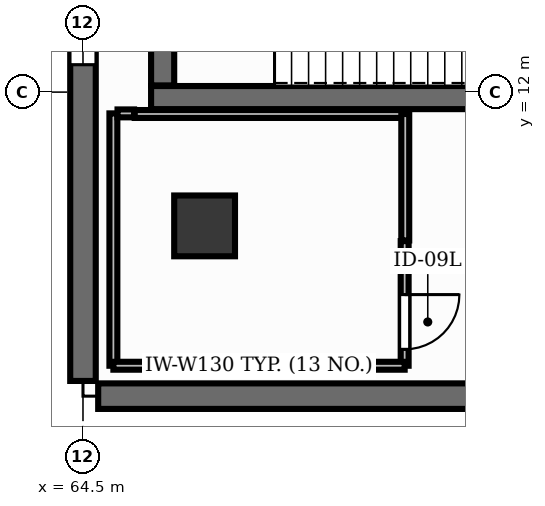
"""IFC4 building model, lengths in metres.
Left out: names, types, materials, properties, quantities, classifications, styles, units other than length and angle.
Written with IfcOpenShell. Run it as: python <this file> out.ifc"""

import sys

from ifc_helpers import new_model, si_unit, direction, frame, frame_2d, origin, origin_2d, place, context, subcontext, project, spatial, rectangle, extrude, element, fill, save


model = new_model("IFC4")
c1 = context("Model", 3, precision=1e-05, world=origin(), true_north=direction((0.0, 1.0)))
c2 = subcontext(c1, "Body", "Model", "MODEL_VIEW")
j1 = project(units=[si_unit("LENGTHUNIT", "METRE"), si_unit("PLANEANGLEUNIT", "RADIAN")], contexts=[c1])
p1 = place(None, origin())
s1 = spatial("IfcSite", under=j1, at=p1, CompositionType="ELEMENT")
p2 = place(p1, origin())
s2 = spatial("IfcBuilding", under=s1, at=p2, CompositionType="ELEMENT")
p3 = place(p2, frame((0.0, 0.0, 5.4)))
s3 = spatial("IfcBuildingStorey", under=s2, at=p3, CompositionType="ELEMENT", Elevation=5.4)
p4 = place(p3, frame((66.5, 9.8, 0.0), z_axis=(0.0, 0.0, 1.0), x_axis=(1.0, 0.0, 0.0)))
e1 = element("IfcColumn", 1, at=p4, inside=s3, PredefinedType="COLUMN", context=c2, shape_type="SweptSolid", body=[
    extrude(rectangle(XDim=1.0, YDim=1.0, at=origin_2d()), origin(), (0.0, 0.0, 1.0), 4.5),
])
p5 = place(p3, frame((64.5, 7.25, 0.0), z_axis=(0.0, 0.0, 1.0), x_axis=(0.0, 1.0, 0.0)))
e2 = element("IfcWall", 2, at=p5, inside=s3, PredefinedType="SHEAR", context=c2, shape_type="SweptSolid", body=[
    extrude(rectangle(XDim=39.5, YDim=0.42, at=frame_2d((19.75, 0.0))), origin(), (0.0, 0.0, 1.0), 4.5),
])
p6 = place(p5, frame((5.2, 0.0, 0.9)))
e3 = element("IfcOpeningElement", 3, at=p6, cuts=e2, PredefinedType="OPENING", context=c2, shape_type="SweptSolid", body=[
    extrude(rectangle(XDim=1.2, YDim=2.7, at=frame_2d((0.6, 1.35))), frame((0.0, 0.225, 0.0), z_axis=(0.0, -1.0, 0.0), x_axis=(1.0, 0.0, 0.0)), (0.0, 0.0, 1.0), 0.45),
])
p7 = place(p5, frame((12.2, 0.0, 0.9)))
e4 = element("IfcOpeningElement", 4, at=p7, cuts=e2, PredefinedType="OPENING", context=c2, shape_type="SweptSolid", body=[
    extrude(rectangle(XDim=1.2, YDim=2.7, at=frame_2d((0.6, 1.35))), frame((0.0, 0.225, 0.0), z_axis=(0.0, -1.0, 0.0), x_axis=(1.0, 0.0, 0.0)), (0.0, 0.0, 1.0), 0.45),
])
p8 = place(p5, frame((25.0, 0.0, 0.9)))
e5 = element("IfcOpeningElement", 5, at=p8, cuts=e2, PredefinedType="OPENING", context=c2, shape_type="SweptSolid", body=[
    extrude(rectangle(XDim=1.2, YDim=2.7, at=frame_2d((0.6, 1.35))), frame((0.0, 0.225, 0.0), z_axis=(0.0, -1.0, 0.0), x_axis=(1.0, 0.0, 0.0)), (0.0, 0.0, 1.0), 0.45),
])
p9 = place(p5, frame((31.8, 0.0, 0.9)))
e6 = element("IfcOpeningElement", 6, at=p9, cuts=e2, PredefinedType="OPENING", context=c2, shape_type="SweptSolid", body=[
    extrude(rectangle(XDim=1.2, YDim=2.7, at=frame_2d((0.6, 1.35))), frame((0.0, 0.225, 0.0), z_axis=(0.0, -1.0, 0.0), x_axis=(1.0, 0.0, 0.0)), (0.0, 0.0, 1.0), 0.45),
])
p10 = place(p3, frame((94.25, 7.0, 0.0), z_axis=(0.0, 0.0, 1.0), x_axis=(-1.0, 0.0, 0.0)))
e7 = element("IfcWall", 7, at=p10, inside=s3, PredefinedType="SHEAR", context=c2, shape_type="SweptSolid", body=[
    extrude(rectangle(XDim=29.5, YDim=0.42, at=frame_2d((14.75, 0.0))), origin(), (0.0, 0.0, 1.0), 4.5),
])
p11 = place(p3, frame((65.62, 11.91, 0.0), z_axis=(0.0, 0.0, 1.0), x_axis=(1.0, 0.0, 0.0)))
e8 = element("IfcWall", 8, at=p11, inside=s3, PredefinedType="SHEAR", context=c2, shape_type="SweptSolid", body=[
    extrude(rectangle(XDim=8.61, YDim=0.38, at=frame_2d((4.305, 0.0))), origin(), (0.0, 0.0, 1.0), 4.5),
])
p12 = place(p3, frame((65.81, 12.11, 0.0), z_axis=(0.0, 0.0, 1.0), x_axis=(0.0, 1.0, 0.0)))
e9 = element("IfcWall", 9, at=p12, inside=s3, PredefinedType="SHEAR", context=c2, shape_type="SweptSolid", body=[
    extrude(rectangle(XDim=3.48, YDim=0.38, at=frame_2d((1.74, 0.0))), origin(), (0.0, 0.0, 1.0), 4.5),
])
p13 = place(p3, frame((69.79, 9.55, 0.0), z_axis=(0.0, 0.0, 1.0), x_axis=(0.0, -1.0, 0.0)))
e10 = element("IfcWall", 10, at=p13, inside=s3, PredefinedType="PARTITIONING", context=c2, shape_type="SweptSolid", body=[
    extrude(rectangle(XDim=2.05, YDim=0.13, at=frame_2d((1.025, 0.0))), origin(), (0.0, 0.0, 1.0), 3.51),
])
p14 = place(p13, frame((0.88, 0.0, 0.0)))
e11 = element("IfcOpeningElement", 11, at=p14, cuts=e10, PredefinedType="OPENING", context=c2, shape_type="SweptSolid", body=[
    extrude(rectangle(XDim=0.9, YDim=2.15, at=frame_2d((0.45, 1.075))), frame((0.0, 0.08, 0.0), z_axis=(0.0, -1.0, 0.0), x_axis=(1.0, 0.0, 0.0)), (0.0, 0.0, 1.0), 0.16),
])
p15 = place(p3, frame((65.0, 7.5, 0.0), z_axis=(0.0, 0.0, 1.0), x_axis=(0.0, 1.0, 0.0)))
e12 = element("IfcWall", 12, at=p15, inside=s3, PredefinedType="PARTITIONING", context=c2, shape_type="SweptSolid", body=[
    extrude(rectangle(XDim=4.15, YDim=0.13, at=frame_2d((2.075, 0.0))), origin(), (0.0, 0.0, 1.0), 3.51),
])
p16 = place(p3, frame((65.068, 11.65, 0.0), z_axis=(0.0, 0.0, 1.0), x_axis=(1.0, 0.0, 0.0)))
e13 = element("IfcWall", 13, at=p16, inside=s3, PredefinedType="PARTITIONING", context=c2, shape_type="SweptSolid", body=[
    extrude(rectangle(XDim=0.272, YDim=0.13, at=frame_2d((0.136, 0.0))), origin(), (0.0, 0.0, 1.0), 3.51),
])
p17 = place(p3, frame((65.35, 11.64, 0.0), z_axis=(0.0, 0.0, 1.0), x_axis=(1.0, 0.0, 0.0)))
e14 = element("IfcWall", 14, at=p17, inside=s3, PredefinedType="PARTITIONING", context=c2, shape_type="SweptSolid", body=[
    extrude(rectangle(XDim=4.45, YDim=0.13, at=frame_2d((2.225, 0.0))), origin(), (0.0, 0.0, 1.0), 3.51),
])
p18 = place(p3, frame((69.8, 11.64, 0.0), z_axis=(0.0, 0.0, 1.0), x_axis=(0.0, -1.0, 0.0)))
e15 = element("IfcWall", 15, at=p18, inside=s3, PredefinedType="PARTITIONING", context=c2, shape_type="SweptSolid", body=[
    extrude(rectangle(XDim=2.08, YDim=0.13, at=frame_2d((1.04, 0.0))), origin(), (0.0, 0.0, 1.0), 3.51),
])
p19 = place(p3, frame((69.79, 7.5, 0.0), z_axis=(0.0, 0.0, 1.0), x_axis=(-1.0, 0.0, 0.0)))
e16 = element("IfcWall", 16, at=p19, inside=s3, PredefinedType="PARTITIONING", context=c2, shape_type="SweptSolid", body=[
    extrude(rectangle(XDim=4.79, YDim=0.13, at=frame_2d((2.395, 0.0))), origin(), (0.0, 0.0, 1.0), 3.51),
])
p20 = place(p6, origin())
e17 = element("IfcWindow", 17, at=p20, inside=s3, PartitioningType="SINGLE_PANEL", PredefinedType="WINDOW", context=c2, shape_type="SweptSolid", body=[
    extrude(rectangle(XDim=1.2, YDim=2.7, at=frame_2d((0.6, 1.35))), frame((0.0, 0.03, 0.0), z_axis=(0.0, -1.0, 0.0), x_axis=(1.0, 0.0, 0.0)), (0.0, 0.0, 1.0), 0.06),
])
fill(e3, e17)
p21 = place(p14, origin())
e18 = element("IfcDoor", 18, at=p21, inside=s3, OperationType="SINGLE_SWING_LEFT", PredefinedType="DOOR", context=c2, shape_type="SweptSolid", body=[
    extrude(rectangle(XDim=0.9, YDim=2.15, at=frame_2d((0.45, 1.075))), frame((0.0, 0.025, 0.0), z_axis=(0.0, -1.0, 0.0), x_axis=(1.0, 0.0, 0.0)), (0.0, 0.0, 1.0), 0.05),
])
fill(e11, e18)
save(model, sys.argv[1])
